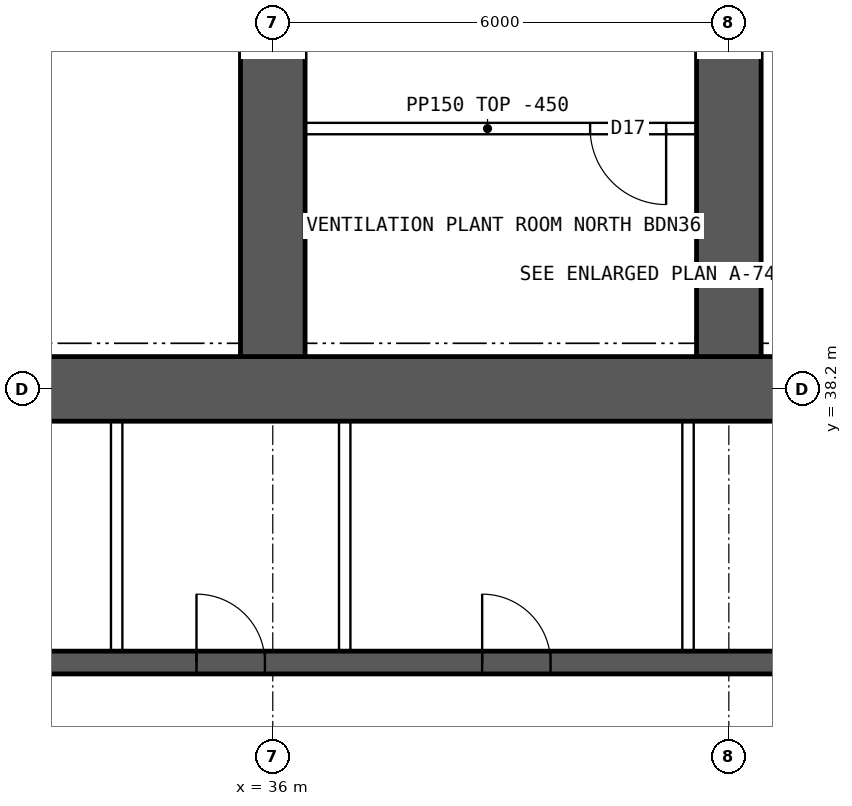
"""IFC4 building model, lengths in metres.
Left out: names, types, materials, properties, quantities, classifications, styles, units other than length and angle.
Written with IfcOpenShell. Run it as: python <this file> out.ifc"""

import sys

from ifc_helpers import new_model, si_unit, direction, frame, frame_2d, origin, place, context, subcontext, project, spatial, rectangle, extrude, element, fill, save


model = new_model("IFC4")
c1 = context("Model", 3, precision=1e-05, world=origin(), true_north=direction((0.0, 1.0)))
c2 = subcontext(c1, "Body", "Model", "MODEL_VIEW")
j1 = project(units=[si_unit("LENGTHUNIT", "METRE"), si_unit("PLANEANGLEUNIT", "RADIAN")], contexts=[c1])
p1 = place(None, origin())
s1 = spatial("IfcSite", under=j1, at=p1, CompositionType="ELEMENT")
p2 = place(p1, origin())
s2 = spatial("IfcBuilding", under=s1, at=p2, CompositionType="ELEMENT")
p3 = place(p2, frame((0.0, 0.0, 174.85)))
s3 = spatial("IfcBuildingStorey", under=s2, at=p3, CompositionType="ELEMENT", Elevation=174.85)
p4 = place(p3, frame((18.0, 38.2, 0.0), z_axis=(0.0, 0.0, 1.0), x_axis=(1.0, 0.0, 0.0)))
e1 = element("IfcWall", 1, at=p4, inside=s3, PredefinedType="SHEAR", context=c2, shape_type="SweptSolid", body=[
    extrude(rectangle(XDim=48.0, YDim=0.85, at=frame_2d((24.0, 0.0))), origin(), (0.0, 0.0, 1.0), 3.75),
])
p5 = place(p3, frame((18.425, 34.6, 0.0), z_axis=(0.0, 0.0, 1.0), x_axis=(1.0, 0.0, 0.0)))
e2 = element("IfcWall", 2, at=p5, inside=s3, PredefinedType="SHEAR", context=c2, shape_type="SweptSolid", body=[
    extrude(rectangle(XDim=47.15, YDim=0.3, at=frame_2d((23.575, 0.0))), origin(), (0.0, 0.0, 1.0), 3.75),
])
p6 = place(p5, frame((0.9, 0.0, 0.0)))
e3 = element("IfcOpeningElement", 3, at=p6, cuts=e2, PredefinedType="OPENING", context=c2, shape_type="SweptSolid", body=[
    extrude(rectangle(XDim=1.1, YDim=2.1, at=frame_2d((0.55, 1.05))), frame((0.0, 0.16, 0.0), z_axis=(0.0, -1.0, 0.0), x_axis=(1.0, 0.0, 0.0)), (0.0, 0.0, 1.0), 0.32),
])
p7 = place(p5, frame((45.15, 0.0, 0.0)))
e4 = element("IfcOpeningElement", 4, at=p7, cuts=e2, PredefinedType="OPENING", context=c2, shape_type="SweptSolid", body=[
    extrude(rectangle(XDim=1.1, YDim=2.1, at=frame_2d((0.55, 1.05))), frame((0.0, 0.16, 0.0), z_axis=(0.0, -1.0, 0.0), x_axis=(1.0, 0.0, 0.0)), (0.0, 0.0, 1.0), 0.32),
])
p8 = place(p5, frame((4.175, 0.0, 0.0)))
e5 = element("IfcOpeningElement", 5, at=p8, cuts=e2, PredefinedType="OPENING", context=c2, shape_type="SweptSolid", body=[
    extrude(rectangle(XDim=0.9, YDim=2.1, at=frame_2d((0.45, 1.05))), frame((0.0, 0.16, 0.0), z_axis=(0.0, -1.0, 0.0), x_axis=(1.0, 0.0, 0.0)), (0.0, 0.0, 1.0), 0.32),
])
p9 = place(p5, frame((42.075, 0.0, 0.0)))
e6 = element("IfcOpeningElement", 6, at=p9, cuts=e2, PredefinedType="OPENING", context=c2, shape_type="SweptSolid", body=[
    extrude(rectangle(XDim=0.9, YDim=2.1, at=frame_2d((0.45, 1.05))), frame((0.0, 0.16, 0.0), z_axis=(0.0, -1.0, 0.0), x_axis=(1.0, 0.0, 0.0)), (0.0, 0.0, 1.0), 0.32),
])
p10 = place(p5, frame((8.95, 0.0, 0.0)))
e7 = element("IfcOpeningElement", 7, at=p10, cuts=e2, PredefinedType="OPENING", context=c2, shape_type="SweptSolid", body=[
    extrude(rectangle(XDim=0.9, YDim=2.1, at=frame_2d((0.45, 1.05))), frame((0.0, 0.16, 0.0), z_axis=(0.0, -1.0, 0.0), x_axis=(1.0, 0.0, 0.0)), (0.0, 0.0, 1.0), 0.32),
])
p11 = place(p5, frame((12.924, 0.0, 0.0)))
e8 = element("IfcOpeningElement", 8, at=p11, cuts=e2, PredefinedType="OPENING", context=c2, shape_type="SweptSolid", body=[
    extrude(rectangle(XDim=0.9, YDim=2.1, at=frame_2d((0.45, 1.05))), frame((0.0, 0.16, 0.0), z_axis=(0.0, -1.0, 0.0), x_axis=(1.0, 0.0, 0.0)), (0.0, 0.0, 1.0), 0.32),
])
p12 = place(p5, frame((16.571, 0.0, 0.0)))
e9 = element("IfcOpeningElement", 9, at=p12, cuts=e2, PredefinedType="OPENING", context=c2, shape_type="SweptSolid", body=[
    extrude(rectangle(XDim=0.9, YDim=2.1, at=frame_2d((0.45, 1.05))), frame((0.0, 0.16, 0.0), z_axis=(0.0, -1.0, 0.0), x_axis=(1.0, 0.0, 0.0)), (0.0, 0.0, 1.0), 0.32),
])
p13 = place(p5, frame((20.33, 0.0, 0.0)))
e10 = element("IfcOpeningElement", 10, at=p13, cuts=e2, PredefinedType="OPENING", context=c2, shape_type="SweptSolid", body=[
    extrude(rectangle(XDim=0.9, YDim=2.1, at=frame_2d((0.45, 1.05))), frame((0.0, 0.16, 0.0), z_axis=(0.0, -1.0, 0.0), x_axis=(1.0, 0.0, 0.0)), (0.0, 0.0, 1.0), 0.32),
])
p14 = place(p5, frame((24.736, 0.0, 0.0)))
e11 = element("IfcOpeningElement", 11, at=p14, cuts=e2, PredefinedType="OPENING", context=c2, shape_type="SweptSolid", body=[
    extrude(rectangle(XDim=0.9, YDim=2.1, at=frame_2d((0.45, 1.05))), frame((0.0, 0.16, 0.0), z_axis=(0.0, -1.0, 0.0), x_axis=(1.0, 0.0, 0.0)), (0.0, 0.0, 1.0), 0.32),
])
p15 = place(p5, frame((27.533, 0.0, 0.0)))
e12 = element("IfcOpeningElement", 12, at=p15, cuts=e2, PredefinedType="OPENING", context=c2, shape_type="SweptSolid", body=[
    extrude(rectangle(XDim=0.9, YDim=2.1, at=frame_2d((0.45, 1.05))), frame((0.0, 0.16, 0.0), z_axis=(0.0, -1.0, 0.0), x_axis=(1.0, 0.0, 0.0)), (0.0, 0.0, 1.0), 0.32),
])
p16 = place(p5, frame((29.5, 0.0, 0.0)))
e13 = element("IfcOpeningElement", 13, at=p16, cuts=e2, PredefinedType="OPENING", context=c2, shape_type="SweptSolid", body=[
    extrude(rectangle(XDim=0.9, YDim=2.1, at=frame_2d((0.45, 1.05))), frame((0.0, 0.16, 0.0), z_axis=(0.0, -1.0, 0.0), x_axis=(1.0, 0.0, 0.0)), (0.0, 0.0, 1.0), 0.32),
])
p17 = place(p5, frame((31.932, 0.0, 0.0)))
e14 = element("IfcOpeningElement", 14, at=p17, cuts=e2, PredefinedType="OPENING", context=c2, shape_type="SweptSolid", body=[
    extrude(rectangle(XDim=0.9, YDim=2.1, at=frame_2d((0.45, 1.05))), frame((0.0, 0.16, 0.0), z_axis=(0.0, -1.0, 0.0), x_axis=(1.0, 0.0, 0.0)), (0.0, 0.0, 1.0), 0.32),
])
p18 = place(p5, frame((34.667, 0.0, 0.0)))
e15 = element("IfcOpeningElement", 15, at=p18, cuts=e2, PredefinedType="OPENING", context=c2, shape_type="SweptSolid", body=[
    extrude(rectangle(XDim=0.9, YDim=2.1, at=frame_2d((0.45, 1.05))), frame((0.0, 0.16, 0.0), z_axis=(0.0, -1.0, 0.0), x_axis=(1.0, 0.0, 0.0)), (0.0, 0.0, 1.0), 0.32),
])
p19 = place(p5, frame((37.707, 0.0, 0.0)))
e16 = element("IfcOpeningElement", 16, at=p19, cuts=e2, PredefinedType="OPENING", context=c2, shape_type="SweptSolid", body=[
    extrude(rectangle(XDim=0.9, YDim=2.1, at=frame_2d((0.45, 1.05))), frame((0.0, 0.16, 0.0), z_axis=(0.0, -1.0, 0.0), x_axis=(1.0, 0.0, 0.0)), (0.0, 0.0, 1.0), 0.32),
])
for number, where, z_axis, x_axis in (
    (17, (36.0, 38.625, 0.0), (0.0, 0.0, 1.0), (0.0, 1.0, 0.0)),
    (18, (42.0, 38.625, 0.0), (0.0, 0.0, 1.0), (0.0, 1.0, 0.0)),
):
    element("IfcWall", number, at=place(p3, frame(where, z_axis=z_axis, x_axis=x_axis)), inside=s3, PredefinedType="SHEAR", context=c2, shape_type="SweptSolid", body=[
        extrude(rectangle(XDim=8.175, YDim=0.85, at=frame_2d((4.087, 0.0))), origin(), (0.0, 0.0, 1.0), 3.75),
    ])
for number, where, z_axis, x_axis in (
    (19, (33.946, 34.75, 0.0), (0.0, 0.0, 1.0), (0.0, 1.0, 0.0)),
    (20, (36.946, 34.75, 0.0), (0.0, 0.0, 1.0), (0.0, 1.0, 0.0)),
    (21, (41.463, 34.75, 0.0), (0.0, 0.0, 1.0), (0.0, 1.0, 0.0)),
):
    element("IfcWall", number, at=place(p3, frame(where, z_axis=z_axis, x_axis=x_axis)), inside=s3, PredefinedType="SOLIDWALL", context=c2, shape_type="SweptSolid", body=[
        extrude(rectangle(XDim=3.025, YDim=0.15, at=frame_2d((1.512, 0.0))), origin(), (0.0, 0.0, 1.0), 3.3),
    ])
p20 = place(p3, frame((41.575, 41.625, 0.0), z_axis=(0.0, 0.0, 1.0), x_axis=(-1.0, 0.0, 0.0)))
e22 = element("IfcWall", 22, at=p20, inside=s3, PredefinedType="PARTITIONING", context=c2, shape_type="SweptSolid", body=[
    extrude(rectangle(XDim=5.5, YDim=0.15, at=frame_2d((2.75, 0.0))), origin(), (0.0, 0.0, 1.0), 3.3),
])
p21 = place(p20, frame((0.4, 0.0, 0.0)))
e23 = element("IfcOpeningElement", 23, at=p21, cuts=e22, PredefinedType="OPENING", context=c2, shape_type="SweptSolid", body=[
    extrude(rectangle(XDim=1.0, YDim=2.1, at=frame_2d((0.5, 1.05))), frame((0.0, 0.085, 0.0), z_axis=(0.0, -1.0, 0.0), x_axis=(1.0, 0.0, 0.0)), (0.0, 0.0, 1.0), 0.17),
])
p22 = place(p12, origin())
e24 = element("IfcDoor", 24, at=p22, inside=s3, OperationType="SINGLE_SWING_LEFT", PredefinedType="DOOR", context=c2, shape_type="SweptSolid", body=[
    extrude(rectangle(XDim=0.9, YDim=2.1, at=frame_2d((0.45, 1.05))), frame((0.0, 0.025, 0.0), z_axis=(0.0, -1.0, 0.0), x_axis=(1.0, 0.0, 0.0)), (0.0, 0.0, 1.0), 0.05),
])
fill(e9, e24)
p23 = place(p13, origin())
e25 = element("IfcDoor", 25, at=p23, inside=s3, OperationType="SINGLE_SWING_LEFT", PredefinedType="DOOR", context=c2, shape_type="SweptSolid", body=[
    extrude(rectangle(XDim=0.9, YDim=2.1, at=frame_2d((0.45, 1.05))), frame((0.0, 0.025, 0.0), z_axis=(0.0, -1.0, 0.0), x_axis=(1.0, 0.0, 0.0)), (0.0, 0.0, 1.0), 0.05),
])
fill(e10, e25)
p24 = place(p21, origin())
e26 = element("IfcDoor", 26, at=p24, inside=s3, OperationType="SINGLE_SWING_LEFT", PredefinedType="DOOR", context=c2, shape_type="SweptSolid", body=[
    extrude(rectangle(XDim=1.0, YDim=2.1, at=frame_2d((0.5, 1.05))), frame((0.0, 0.025, 0.0), z_axis=(0.0, -1.0, 0.0), x_axis=(1.0, 0.0, 0.0)), (0.0, 0.0, 1.0), 0.05),
])
fill(e23, e26)
save(model, sys.argv[1])
